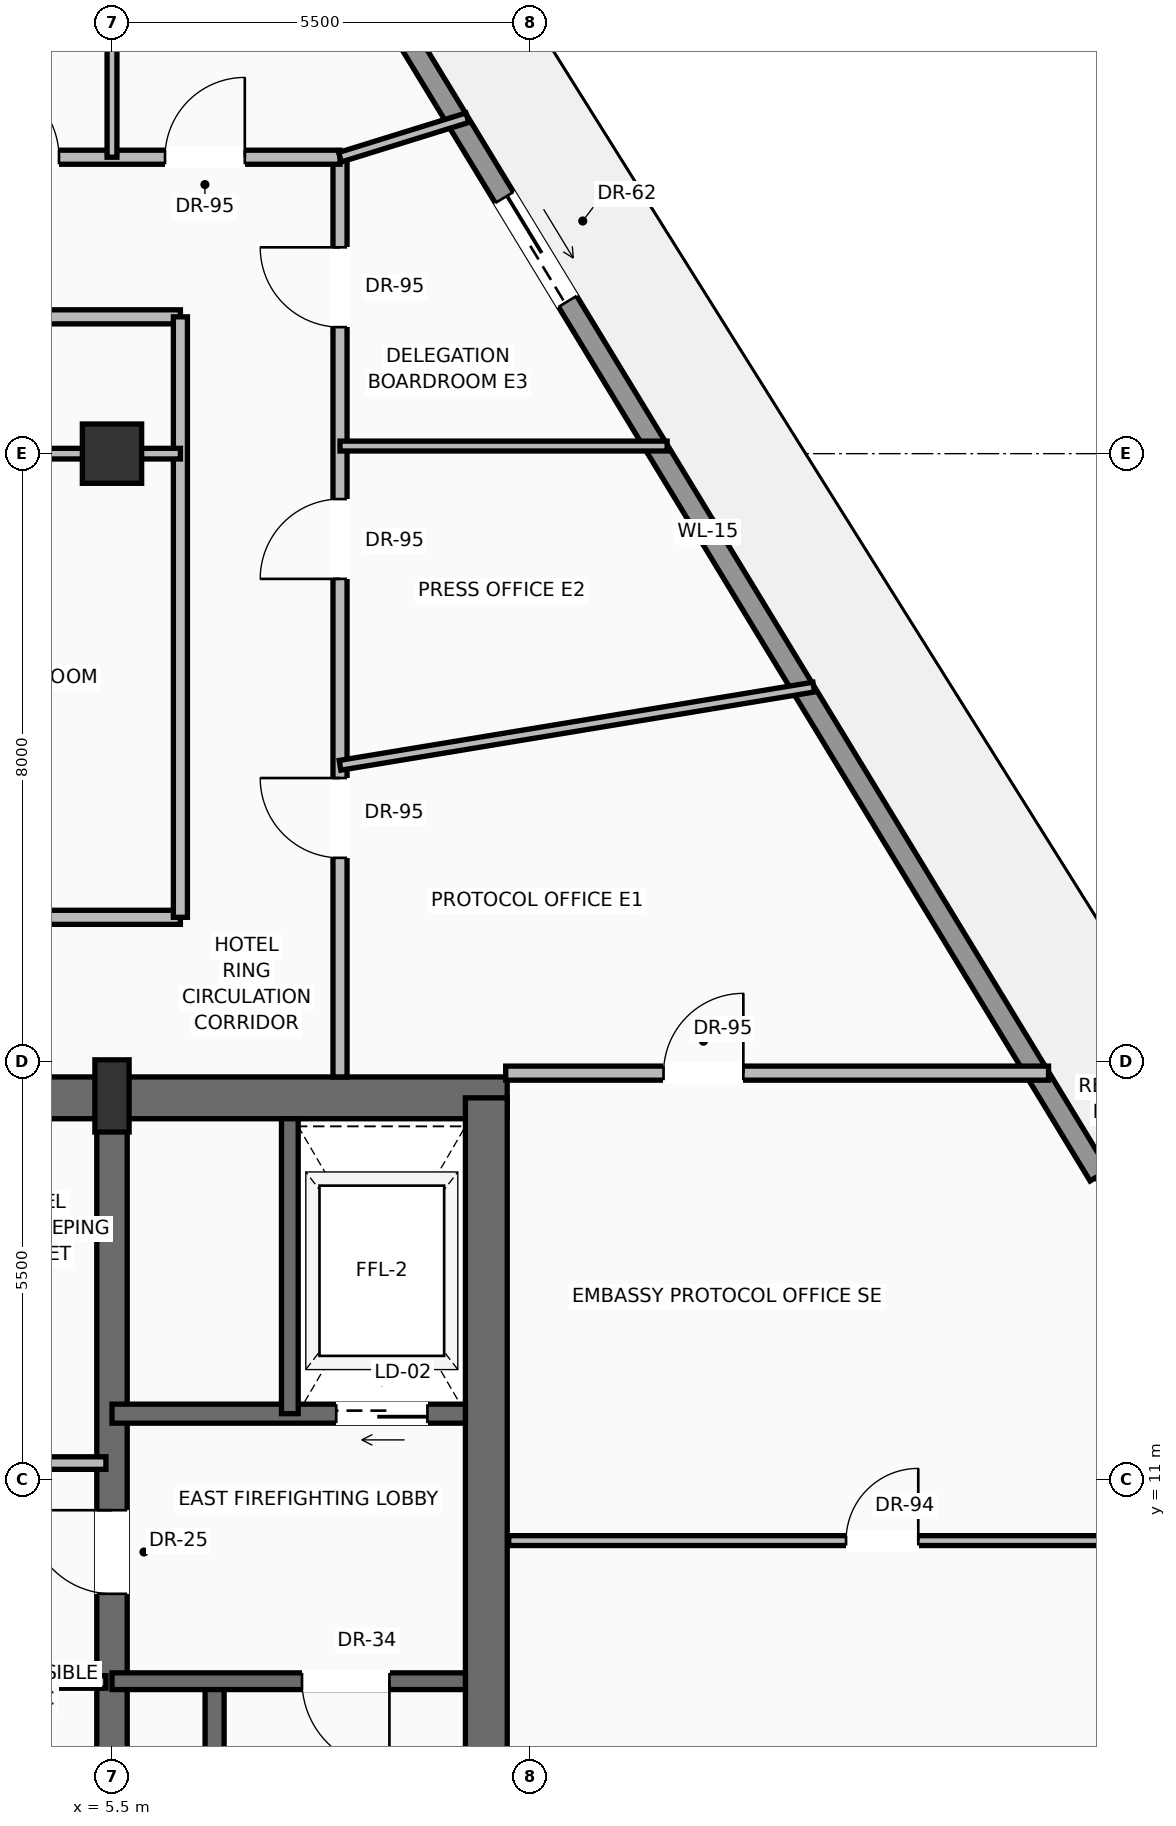
"""IFC4 building model, lengths in metres.
Left out: names, types, materials, properties, quantities, classifications, styles, units other than length and angle.
Written with IfcOpenShell. Run it as: python <this file> out.ifc"""

import sys

from ifc_helpers import new_model, si_unit, direction, frame, frame_2d, origin, origin_2d, place, context, subcontext, project, spatial, rectangle, extrude, source, transform, mapped, element, fill, save


model = new_model("IFC4")
c1 = context("Model", 3, precision=1e-05, world=origin(), true_north=direction((0.0, 1.0)))
c2 = subcontext(c1, "Body", "Model", "MODEL_VIEW")
j1 = project(units=[si_unit("LENGTHUNIT", "METRE"), si_unit("PLANEANGLEUNIT", "RADIAN")], contexts=[c1])
p1 = place(None, origin())
s1 = spatial("IfcSite", under=j1, at=p1, CompositionType="ELEMENT")
p2 = place(p1, origin())
s2 = spatial("IfcBuilding", under=s1, at=p2, CompositionType="ELEMENT")
p3 = place(p2, frame((0.0, 0.0, 254.5)))
s3 = spatial("IfcBuildingStorey", under=s2, at=p3, CompositionType="ELEMENT", Elevation=254.5)
p4 = place(p3, frame((-10.7, 16.025, 0.0), z_axis=(0.0, 0.0, 1.0), x_axis=(1.0, 0.0, 0.0)))
e1 = element("IfcWall", 1, at=p4, inside=s3, PredefinedType="SHEAR", context=c2, shape_type="SweptSolid", body=[
    extrude(rectangle(XDim=21.4, YDim=0.55, at=frame_2d((10.7, 0.0))), origin(), (0.0, 0.0, 1.0), 3.15),
])
p5 = place(p4, frame((3.27, 0.0, 0.0)))
e2 = element("IfcOpeningElement", 2, at=p5, cuts=e1, PredefinedType="OPENING", context=c2, shape_type="SweptSolid", body=[
    extrude(rectangle(XDim=1.3, YDim=2.3, at=frame_2d((0.65, 1.15))), frame((0.0, 0.285, 0.0), z_axis=(0.0, -1.0, 0.0), x_axis=(1.0, 0.0, 0.0)), (0.0, 0.0, 1.0), 0.57),
])
p6 = place(p4, frame((9.7, 0.0, 0.0)))
e3 = element("IfcOpeningElement", 3, at=p6, cuts=e1, PredefinedType="OPENING", context=c2, shape_type="SweptSolid", body=[
    extrude(rectangle(XDim=2.0, YDim=2.4, at=frame_2d((1.0, 1.2))), frame((0.0, 0.285, 0.0), z_axis=(0.0, -1.0, 0.0), x_axis=(1.0, 0.0, 0.0)), (0.0, 0.0, 1.0), 0.57),
])
p7 = place(p3, frame((10.425, 0.575, 0.0), z_axis=(0.0, 0.0, 1.0), x_axis=(0.0, 1.0, 0.0)))
e4 = element("IfcWall", 4, at=p7, inside=s3, PredefinedType="SHEAR", context=c2, shape_type="SweptSolid", body=[
    extrude(rectangle(XDim=15.45, YDim=0.55, at=frame_2d((7.725, 0.0))), origin(), (0.0, 0.0, 1.0), 3.15),
])
p8 = place(p3, frame((5.5, 0.575, 0.0), z_axis=(0.0, 0.0, 1.0), x_axis=(0.0, 1.0, 0.0)))
e5 = element("IfcWall", 5, at=p8, inside=s3, PredefinedType="SHEAR", context=c2, shape_type="SweptSolid", body=[
    extrude(rectangle(XDim=15.45, YDim=0.4, at=frame_2d((7.725, 0.0))), origin(), (0.0, 0.0, 1.0), 3.15),
])
p9 = place(p8, frame((8.925, 0.0, 0.0)))
e6 = element("IfcOpeningElement", 6, at=p9, cuts=e5, PredefinedType="OPENING", context=c2, shape_type="SweptSolid", body=[
    extrude(rectangle(XDim=1.1, YDim=2.2, at=frame_2d((0.55, 1.1))), frame((0.0, 0.21, 0.0), z_axis=(0.0, -1.0, 0.0), x_axis=(1.0, 0.0, 0.0)), (0.0, 0.0, 1.0), 0.42),
])
m1 = source(origin(), c2, "Body", "SweptSolid", [
    extrude(rectangle(XDim=0.45, YDim=0.95, at=origin_2d()), origin(), (0.0, 0.0, 1.0), 3.45),
])
p10 = place(p3, frame((5.5, 16.05, 0.0), z_axis=(0.0, 0.0, 1.0), x_axis=(1.0, 0.0, 0.0)))
e7 = element("IfcColumn", 7, at=p10, inside=s3, PredefinedType="PILASTER", context=c2, shape_type="MappedRepresentation", body=[
    mapped(m1, transform((0.0, 0.0, 0.0), scale=1.0)),
])
m2 = source(origin(), c2, "Body", "SweptSolid", [
    extrude(rectangle(XDim=0.78, YDim=0.78, at=origin_2d()), origin(), (0.0, 0.0, 1.0), 3.45),
])
p11 = place(p3, frame((5.5, 24.5, 0.0), z_axis=(0.0, 0.0, 1.0), x_axis=(1.0, 0.0, 0.0)))
e8 = element("IfcColumn", 8, at=p11, inside=s3, PredefinedType="COLUMN", context=c2, shape_type="MappedRepresentation", body=[
    mapped(m2, transform((0.0, 0.0, 0.0), scale=1.0)),
])
p12 = place(p3, frame((8.192, 31.933, 0.0), z_axis=(0.0, 0.0, 1.0), x_axis=(0.51964514921, -0.854382185502, 0.0)))
e9 = element("IfcWall", 9, at=p12, inside=s3, PredefinedType="SOLIDWALL", context=c2, shape_type="SweptSolid", body=[
    extrude(rectangle(XDim=19.814, YDim=0.28, at=frame_2d((9.907, 0.0))), origin(), (0.0, 0.0, 1.0), 2.73),
])
p13 = place(p12, frame((4.755, 0.0, 0.0)))
e10 = element("IfcOpeningElement", 10, at=p13, cuts=e9, PredefinedType="OPENING", context=c2, shape_type="SweptSolid", body=[
    extrude(rectangle(XDim=1.6, YDim=2.35, at=frame_2d((0.8, 1.175))), frame((0.0, 0.15, 0.0), z_axis=(0.0, -1.0, 0.0), x_axis=(1.0, 0.0, 0.0)), (0.0, 0.0, 1.0), 0.3),
])
p14 = place(p3, frame((6.85, 0.85, 0.0), z_axis=(0.0, 0.0, 1.0), x_axis=(0.0, 1.0, 0.0)))
e11 = element("IfcWall", 11, at=p14, inside=s3, PredefinedType="SOLIDWALL", context=c2, shape_type="SweptSolid", body=[
    extrude(rectangle(XDim=7.5, YDim=0.25, at=frame_2d((3.75, 0.0))), origin(), (0.0, 0.0, 1.0), 3.15),
])
p15 = place(p3, frame((10.15, 8.35, 0.0), z_axis=(0.0, 0.0, 1.0), x_axis=(-1.0, 0.0, 0.0)))
e12 = element("IfcWall", 12, at=p15, inside=s3, PredefinedType="SOLIDWALL", context=c2, shape_type="SweptSolid", body=[
    extrude(rectangle(XDim=4.65, YDim=0.22, at=frame_2d((2.325, 0.0))), origin(), (0.0, 0.0, 1.0), 3.15),
])
p16 = place(p15, frame((1.0, 0.0, 0.0)))
e13 = element("IfcOpeningElement", 13, at=p16, cuts=e12, PredefinedType="OPENING", context=c2, shape_type="SweptSolid", body=[
    extrude(rectangle(XDim=1.15, YDim=2.2, at=frame_2d((0.575, 1.1))), frame((0.0, 0.12, 0.0), z_axis=(0.0, -1.0, 0.0), x_axis=(1.0, 0.0, 0.0)), (0.0, 0.0, 1.0), 0.24),
])
p17 = place(p3, frame((10.15, 11.87, 0.0), z_axis=(0.0, 0.0, 1.0), x_axis=(-1.0, 0.0, 0.0)))
e14 = element("IfcWall", 14, at=p17, inside=s3, PredefinedType="SOLIDWALL", context=c2, shape_type="SweptSolid", body=[
    extrude(rectangle(XDim=4.65, YDim=0.25, at=frame_2d((2.325, 0.0))), origin(), (0.0, 0.0, 1.0), 3.15),
])
p18 = place(p17, frame((0.5, 0.0, 0.0)))
e15 = element("IfcOpeningElement", 15, at=p18, cuts=e14, PredefinedType="OPENING", context=c2, shape_type="SweptSolid", body=[
    extrude(rectangle(XDim=1.2, YDim=2.25, at=frame_2d((0.6, 1.125))), frame((0.0, 0.135, 0.0), z_axis=(0.0, -1.0, 0.0), x_axis=(1.0, 0.0, 0.0)), (0.0, 0.0, 1.0), 0.27),
])
p19 = place(p3, frame((7.84, 11.87, 0.0), z_axis=(0.0, 0.0, 1.0), x_axis=(0.0, 1.0, 0.0)))
e16 = element("IfcWall", 16, at=p19, inside=s3, PredefinedType="SOLIDWALL", context=c2, shape_type="SweptSolid", body=[
    extrude(rectangle(XDim=3.88, YDim=0.22, at=frame_2d((1.94, 0.0))), origin(), (0.0, 0.0, 1.0), 3.15),
])
for number, where, z_axis, x_axis in (
    (17, (3.54, 8.34, 0.0), (0.0, 0.0, 1.0), (1.0, 0.0, 0.0)),
    (18, (3.54, 11.22, 0.0), (0.0, 0.0, 1.0), (1.0, 0.0, 0.0)),
):
    element("IfcWall", number, at=place(p3, frame(where, z_axis=z_axis, x_axis=x_axis)), inside=s3, PredefinedType="PARTITIONING", context=c2, shape_type="SweptSolid", body=[
        extrude(rectangle(XDim=1.88, YDim=0.165, at=frame_2d((0.94, 0.0))), origin(), (0.0, 0.0, 1.0), 3.142),
    ])
p20 = place(p3, frame((-6.2, 18.4, 0.0), z_axis=(0.0, 0.0, 1.0), x_axis=(1.0, 0.0, 0.0)))
e19 = element("IfcWall", 19, at=p20, inside=s3, PredefinedType="PARTITIONING", context=c2, shape_type="SweptSolid", body=[
    extrude(rectangle(XDim=12.6, YDim=0.185, at=frame_2d((6.3, 0.0))), origin(), (0.0, 0.0, 1.0), 3.142),
])
p21 = place(p20, frame((5.825, 0.0, 0.0)))
e20 = element("IfcOpeningElement", 20, at=p21, cuts=e19, PredefinedType="OPENING", context=c2, shape_type="SweptSolid", body=[
    extrude(rectangle(XDim=0.95, YDim=2.2, at=frame_2d((0.475, 1.1))), frame((0.0, 0.103, 0.0), z_axis=(0.0, -1.0, 0.0), x_axis=(1.0, 0.0, 0.0)), (0.0, 0.0, 1.0), 0.205),
])
p22 = place(p3, frame((-6.2, 26.3, 0.0), z_axis=(0.0, 0.0, 1.0), x_axis=(1.0, 0.0, 0.0)))
e21 = element("IfcWall", 21, at=p22, inside=s3, PredefinedType="PARTITIONING", context=c2, shape_type="SweptSolid", body=[
    extrude(rectangle(XDim=12.6, YDim=0.185, at=frame_2d((6.3, 0.0))), origin(), (0.0, 0.0, 1.0), 3.142),
])
p23 = place(p22, frame((5.825, 0.0, 0.0)))
e22 = element("IfcOpeningElement", 22, at=p23, cuts=e21, PredefinedType="OPENING", context=c2, shape_type="SweptSolid", body=[
    extrude(rectangle(XDim=0.95, YDim=2.2, at=frame_2d((0.475, 1.1))), frame((0.0, 0.103, 0.0), z_axis=(0.0, -1.0, 0.0), x_axis=(1.0, 0.0, 0.0)), (0.0, 0.0, 1.0), 0.205),
])
p24 = place(p3, frame((6.4, 18.4, 0.0), z_axis=(0.0, 0.0, 1.0), x_axis=(0.0, 1.0, 0.0)))
e23 = element("IfcWall", 23, at=p24, inside=s3, PredefinedType="PARTITIONING", context=c2, shape_type="SweptSolid", body=[
    extrude(rectangle(XDim=7.9, YDim=0.185, at=frame_2d((3.95, 0.0))), origin(), (0.0, 0.0, 1.0), 3.142),
])
p25 = place(p3, frame((8.5, 16.3, 0.0), z_axis=(0.0, 0.0, 1.0), x_axis=(0.0, 1.0, 0.0)))
e24 = element("IfcWall", 24, at=p25, inside=s3, PredefinedType="PARTITIONING", context=c2, shape_type="SweptSolid", body=[
    extrude(rectangle(XDim=12.1, YDim=0.185, at=frame_2d((6.05, 0.0))), origin(), (0.0, 0.0, 1.0), 3.142),
])
p26 = place(p25, frame((2.882, 0.0, 0.0)))
e25 = element("IfcOpeningElement", 25, at=p26, cuts=e24, PredefinedType="OPENING", context=c2, shape_type="SweptSolid", body=[
    extrude(rectangle(XDim=1.05, YDim=2.25, at=frame_2d((0.525, 1.125))), frame((0.0, 0.103, 0.0), z_axis=(0.0, -1.0, 0.0), x_axis=(1.0, 0.0, 0.0)), (0.0, 0.0, 1.0), 0.205),
])
p27 = place(p25, frame((6.552, 0.0, 0.0)))
e26 = element("IfcOpeningElement", 26, at=p27, cuts=e24, PredefinedType="OPENING", context=c2, shape_type="SweptSolid", body=[
    extrude(rectangle(XDim=1.05, YDim=2.25, at=frame_2d((0.525, 1.125))), frame((0.0, 0.103, 0.0), z_axis=(0.0, -1.0, 0.0), x_axis=(1.0, 0.0, 0.0)), (0.0, 0.0, 1.0), 0.205),
])
p28 = place(p25, frame((9.865, 0.0, 0.0)))
e27 = element("IfcOpeningElement", 27, at=p28, cuts=e24, PredefinedType="OPENING", context=c2, shape_type="SweptSolid", body=[
    extrude(rectangle(XDim=1.05, YDim=2.25, at=frame_2d((0.525, 1.125))), frame((0.0, 0.103, 0.0), z_axis=(0.0, -1.0, 0.0), x_axis=(1.0, 0.0, 0.0)), (0.0, 0.0, 1.0), 0.205),
])
p29 = place(p3, frame((-8.3, 28.4, 0.0), z_axis=(0.0, 0.0, 1.0), x_axis=(1.0, 0.0, 0.0)))
e28 = element("IfcWall", 28, at=p29, inside=s3, PredefinedType="PARTITIONING", context=c2, shape_type="SweptSolid", body=[
    extrude(rectangle(XDim=16.8, YDim=0.185, at=frame_2d((8.4, 0.0))), origin(), (0.0, 0.0, 1.0), 3.142),
])
p30 = place(p29, frame((3.498, 0.0, 0.0)))
e29 = element("IfcOpeningElement", 29, at=p30, cuts=e28, PredefinedType="OPENING", context=c2, shape_type="SweptSolid", body=[
    extrude(rectangle(XDim=1.05, YDim=2.25, at=frame_2d((0.525, 1.125))), frame((0.0, 0.103, 0.0), z_axis=(0.0, -1.0, 0.0), x_axis=(1.0, 0.0, 0.0)), (0.0, 0.0, 1.0), 0.205),
])
p31 = place(p29, frame((8.998, 0.0, 0.0)))
e30 = element("IfcOpeningElement", 30, at=p31, cuts=e28, PredefinedType="OPENING", context=c2, shape_type="SweptSolid", body=[
    extrude(rectangle(XDim=1.05, YDim=2.25, at=frame_2d((0.525, 1.125))), frame((0.0, 0.103, 0.0), z_axis=(0.0, -1.0, 0.0), x_axis=(1.0, 0.0, 0.0)), (0.0, 0.0, 1.0), 0.205),
])
p32 = place(p29, frame((12.052, 0.0, 0.0)))
e31 = element("IfcOpeningElement", 31, at=p32, cuts=e28, PredefinedType="OPENING", context=c2, shape_type="SweptSolid", body=[
    extrude(rectangle(XDim=1.05, YDim=2.25, at=frame_2d((0.525, 1.125))), frame((0.0, 0.103, 0.0), z_axis=(0.0, -1.0, 0.0), x_axis=(1.0, 0.0, 0.0)), (0.0, 0.0, 1.0), 0.205),
])
p33 = place(p29, frame((14.498, 0.0, 0.0)))
e32 = element("IfcOpeningElement", 32, at=p33, cuts=e28, PredefinedType="OPENING", context=c2, shape_type="SweptSolid", body=[
    extrude(rectangle(XDim=1.05, YDim=2.25, at=frame_2d((0.525, 1.125))), frame((0.0, 0.103, 0.0), z_axis=(0.0, -1.0, 0.0), x_axis=(1.0, 0.0, 0.0)), (0.0, 0.0, 1.0), 0.205),
])
p34 = place(p29, frame((1.052, 0.0, 0.0)))
e33 = element("IfcOpeningElement", 33, at=p34, cuts=e28, PredefinedType="OPENING", context=c2, shape_type="SweptSolid", body=[
    extrude(rectangle(XDim=1.05, YDim=2.25, at=frame_2d((0.525, 1.125))), frame((0.0, 0.103, 0.0), z_axis=(0.0, -1.0, 0.0), x_axis=(1.0, 0.0, 0.0)), (0.0, 0.0, 1.0), 0.205),
])
p35 = place(p3, frame((-6.2, 24.5, 0.0), z_axis=(0.0, 0.0, 1.0), x_axis=(1.0, 0.0, 0.0)))
e34 = element("IfcWall", 34, at=p35, inside=s3, PredefinedType="PARTITIONING", context=c2, shape_type="SweptSolid", body=[
    extrude(rectangle(XDim=12.6, YDim=0.14, at=frame_2d((6.3, 0.0))), origin(), (0.0, 0.0, 1.0), 2.593),
])
p36 = place(p3, frame((10.68, 16.35, 0.0), z_axis=(0.0, 0.0, 1.0), x_axis=(1.0, 0.0, 0.0)))
e35 = element("IfcWall", 35, at=p36, inside=s3, PredefinedType="PARTITIONING", context=c2, shape_type="SweptSolid", body=[
    extrude(rectangle(XDim=7.142, YDim=0.185, at=frame_2d((3.571, 0.0))), origin(), (0.0, 0.0, 1.0), 3.142),
])
p37 = place(p36, frame((2.077, 0.0, 0.0)))
e36 = element("IfcOpeningElement", 36, at=p37, cuts=e35, PredefinedType="OPENING", context=c2, shape_type="SweptSolid", body=[
    extrude(rectangle(XDim=1.05, YDim=2.25, at=frame_2d((0.525, 1.125))), frame((0.0, 0.103, 0.0), z_axis=(0.0, -1.0, 0.0), x_axis=(1.0, 0.0, 0.0)), (0.0, 0.0, 1.0), 0.205),
])
p38 = place(p3, frame((8.5, 28.4, 0.0), z_axis=(0.0, 0.0, 1.0), x_axis=(0.955069567147, 0.296381716556, 0.0)))
e37 = element("IfcWall", 37, at=p38, inside=s3, PredefinedType="PARTITIONING", context=c2, shape_type="SweptSolid", body=[
    extrude(rectangle(XDim=1.755, YDim=0.13, at=frame_2d((0.878, 0.0))), origin(), (0.0, 0.0, 1.0), 3.142),
])
p39 = place(p3, frame((5.5, 28.4, 0.0), z_axis=(0.0, 0.0, 1.0), x_axis=(0.0, 1.0, 0.0)))
e38 = element("IfcWall", 38, at=p39, inside=s3, PredefinedType="PARTITIONING", context=c2, shape_type="SweptSolid", body=[
    extrude(rectangle(XDim=8.209, YDim=0.13, at=frame_2d((4.104, 0.0))), origin(), (0.0, 0.0, 1.0), 2.593),
])
p40 = place(p3, frame((10.72, 10.2, 0.0), z_axis=(0.0, 0.0, 1.0), x_axis=(1.0, 0.0, 0.0)))
e39 = element("IfcWall", 39, at=p40, inside=s3, PredefinedType="PARTITIONING", context=c2, shape_type="SweptSolid", body=[
    extrude(rectangle(XDim=10.843, YDim=0.13, at=frame_2d((5.421, 0.0))), origin(), (0.0, 0.0, 1.0), 3.142),
])
p41 = place(p40, frame((4.438, 0.0, 0.0)))
e40 = element("IfcOpeningElement", 40, at=p41, cuts=e39, PredefinedType="OPENING", context=c2, shape_type="SweptSolid", body=[
    extrude(rectangle(XDim=0.95, YDim=2.2, at=frame_2d((0.475, 1.1))), frame((0.0, 0.075, 0.0), z_axis=(0.0, -1.0, 0.0), x_axis=(1.0, 0.0, 0.0)), (0.0, 0.0, 1.0), 0.15),
])
p42 = place(p3, frame((8.5, 20.4, 0.0), z_axis=(0.0, 0.0, 1.0), x_axis=(0.986649667214, 0.16285709744, 0.0)))
e41 = element("IfcWall", 41, at=p42, inside=s3, PredefinedType="PARTITIONING", context=c2, shape_type="SweptSolid", body=[
    extrude(rectangle(XDim=6.317, YDim=0.13, at=frame_2d((3.159, 0.0))), origin(), (0.0, 0.0, 1.0), 3.142),
])
p43 = place(p3, frame((8.5, 24.6, 0.0), z_axis=(0.0, 0.0, 1.0), x_axis=(1.0, 0.0, 0.0)))
e42 = element("IfcWall", 42, at=p43, inside=s3, PredefinedType="PARTITIONING", context=c2, shape_type="SweptSolid", body=[
    extrude(rectangle(XDim=4.304, YDim=0.13, at=frame_2d((2.152, 0.0))), origin(), (0.0, 0.0, 1.0), 2.593),
])
m3 = source(origin(), c2, "Body", "SweptSolid", [
    extrude(rectangle(XDim=1.6, YDim=2.35, at=frame_2d((0.8, 1.175))), frame((0.0, 0.025, 0.0), z_axis=(0.0, -1.0, 0.0), x_axis=(1.0, 0.0, 0.0)), (0.0, 0.0, 1.0), 0.05),
])
p44 = place(p13, origin())
e43 = element("IfcDoor", 43, at=p44, inside=s3, OperationType="SLIDING_TO_RIGHT", PredefinedType="DOOR", context=c2, shape_type="MappedRepresentation", body=[
    mapped(m3, transform((0.0, 0.0, 0.0), scale=1.0)),
])
fill(e10, e43)
m4 = source(origin(), c2, "Body", "SweptSolid", [
    extrude(rectangle(XDim=1.15, YDim=2.2, at=frame_2d((0.575, 1.1))), frame((0.0, 0.025, 0.0), z_axis=(0.0, -1.0, 0.0), x_axis=(1.0, 0.0, 0.0)), (0.0, 0.0, 1.0), 0.05),
])
p45 = place(p16, origin())
e44 = element("IfcDoor", 44, at=p45, inside=s3, OperationType="SINGLE_SWING_LEFT", PredefinedType="DOOR", context=c2, shape_type="MappedRepresentation", body=[
    mapped(m4, transform((0.0, 0.0, 0.0), scale=1.0)),
])
fill(e13, e44)
m5 = source(origin(), c2, "Body", "SweptSolid", [
    extrude(rectangle(XDim=1.1, YDim=2.2, at=frame_2d((0.55, 1.1))), frame((0.0, 0.025, 0.0), z_axis=(0.0, -1.0, 0.0), x_axis=(1.0, 0.0, 0.0)), (0.0, 0.0, 1.0), 0.05),
])
p46 = place(p9, origin())
e45 = element("IfcDoor", 45, at=p46, inside=s3, OperationType="SINGLE_SWING_RIGHT", PredefinedType="DOOR", context=c2, shape_type="MappedRepresentation", body=[
    mapped(m5, transform((0.0, 0.0, 0.0), scale=1.0)),
])
fill(e6, e45)
m6 = source(origin(), c2, "Body", "SweptSolid", [
    extrude(rectangle(XDim=1.2, YDim=2.25, at=frame_2d((0.6, 1.125))), frame((0.0, 0.025, 0.0), z_axis=(0.0, -1.0, 0.0), x_axis=(1.0, 0.0, 0.0)), (0.0, 0.0, 1.0), 0.05),
])
p47 = place(p18, origin())
e46 = element("IfcDoor", 46, at=p47, inside=s3, OperationType="SLIDING_TO_RIGHT", PredefinedType="DOOR", context=c2, shape_type="MappedRepresentation", body=[
    mapped(m6, transform((0.0, 0.0, 0.0), scale=1.0)),
])
fill(e15, e46)
m7 = source(origin(), c2, "Body", "SweptSolid", [
    extrude(rectangle(XDim=1.05, YDim=2.25, at=frame_2d((0.525, 1.125))), frame((0.0, 0.025, 0.0), z_axis=(0.0, -1.0, 0.0), x_axis=(1.0, 0.0, 0.0)), (0.0, 0.0, 1.0), 0.05),
])
p48 = place(p37, origin())
e47 = element("IfcDoor", 47, at=p48, inside=s3, OperationType="SINGLE_SWING_RIGHT", PredefinedType="DOOR", context=c2, shape_type="MappedRepresentation", body=[
    mapped(m7, transform((0.0, 0.0, 0.0), scale=1.0)),
])
fill(e36, e47)
m8 = source(origin(), c2, "Body", "SweptSolid", [
    extrude(rectangle(XDim=0.95, YDim=2.2, at=frame_2d((0.475, 1.1))), frame((0.0, 0.025, 0.0), z_axis=(0.0, -1.0, 0.0), x_axis=(1.0, 0.0, 0.0)), (0.0, 0.0, 1.0), 0.05),
])
p49 = place(p41, origin())
e48 = element("IfcDoor", 48, at=p49, inside=s3, OperationType="SINGLE_SWING_RIGHT", PredefinedType="DOOR", context=c2, shape_type="MappedRepresentation", body=[
    mapped(m8, transform((0.0, 0.0, 0.0), scale=1.0)),
])
fill(e40, e48)
p50 = place(p26, origin())
e49 = element("IfcDoor", 49, at=p50, inside=s3, OperationType="SINGLE_SWING_RIGHT", PredefinedType="DOOR", context=c2, shape_type="MappedRepresentation", body=[
    mapped(m7, transform((0.0, 0.0, 0.0), scale=1.0)),
])
fill(e25, e49)
p51 = place(p27, origin())
e50 = element("IfcDoor", 50, at=p51, inside=s3, OperationType="SINGLE_SWING_LEFT", PredefinedType="DOOR", context=c2, shape_type="MappedRepresentation", body=[
    mapped(m7, transform((0.0, 0.0, 0.0), scale=1.0)),
])
fill(e26, e50)
p52 = place(p28, origin())
e51 = element("IfcDoor", 51, at=p52, inside=s3, OperationType="SINGLE_SWING_RIGHT", PredefinedType="DOOR", context=c2, shape_type="MappedRepresentation", body=[
    mapped(m7, transform((0.0, 0.0, 0.0), scale=1.0)),
])
fill(e27, e51)
p53 = place(p32, origin())
e52 = element("IfcDoor", 52, at=p53, inside=s3, OperationType="SINGLE_SWING_LEFT", PredefinedType="DOOR", context=c2, shape_type="MappedRepresentation", body=[
    mapped(m7, transform((0.0, 0.0, 0.0), scale=1.0)),
])
fill(e31, e52)
p54 = place(p33, origin())
e53 = element("IfcDoor", 53, at=p54, inside=s3, OperationType="SINGLE_SWING_RIGHT", PredefinedType="DOOR", context=c2, shape_type="MappedRepresentation", body=[
    mapped(m7, transform((0.0, 0.0, 0.0), scale=1.0)),
])
fill(e32, e53)
save(model, sys.argv[1])
